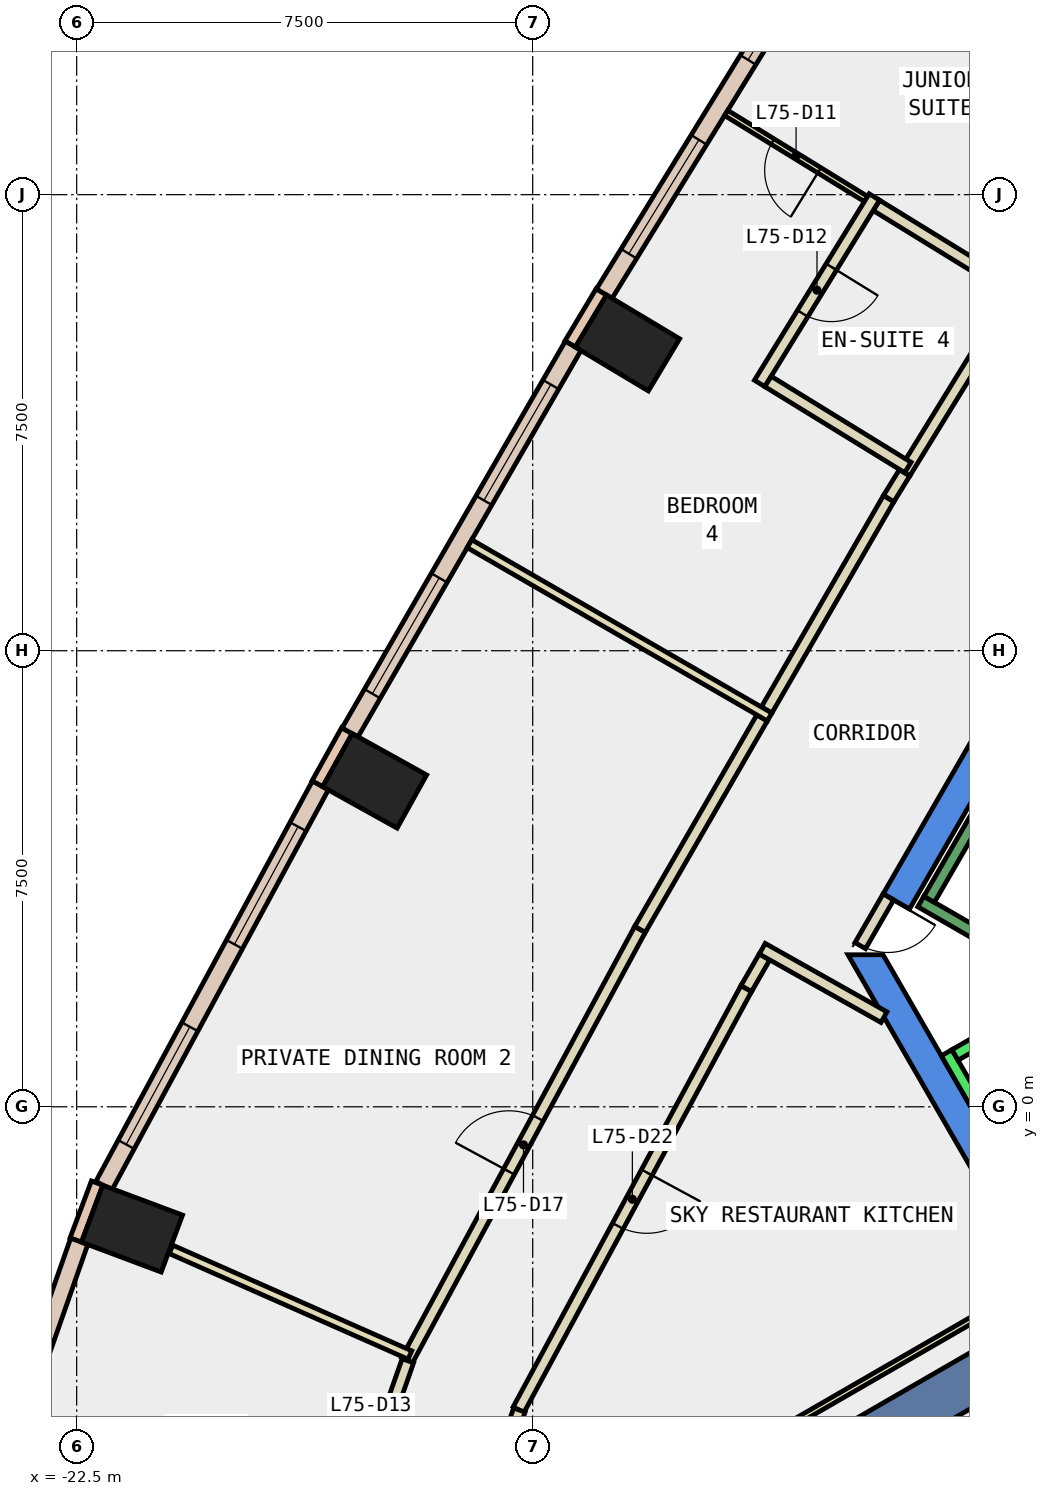
"""IFC4 building model, lengths in metres.
Left out: names, types, materials, properties, quantities, classifications, styles, units other than length and angle.
Written with IfcOpenShell. Run it as: python <this file> out.ifc"""

import sys

from ifc_helpers import new_model, si_unit, direction, frame, frame_2d, origin, origin_2d, place, context, subcontext, project, spatial, polyline, rectangle, outline, extrude, element, fill, save


model = new_model("IFC4")
c1 = context("Model", 3, precision=1e-05, world=origin(), true_north=direction((0.0, 1.0)))
c2 = subcontext(c1, "Body", "Model", "MODEL_VIEW")
j1 = project(units=[si_unit("LENGTHUNIT", "METRE"), si_unit("PLANEANGLEUNIT", "RADIAN")], contexts=[c1])
p1 = place(None, origin())
s1 = spatial("IfcSite", under=j1, at=p1, CompositionType="ELEMENT")
p2 = place(p1, origin())
s2 = spatial("IfcBuilding", under=s1, at=p2, CompositionType="ELEMENT")
p3 = place(p2, frame((0.0, 0.0, 318.8)))
s3 = spatial("IfcBuildingStorey", under=s2, at=p3, CompositionType="ELEMENT", Elevation=318.8)
for number, where, z_axis, x_axis in (
    (1, (-13.441, 12.561, -0.34), (0.0, 0.0, 1.0), (0.514, 0.858, 0.0)),
    (2, (-17.599, 5.36, -0.34), (0.0, 0.0, 1.0), (0.486, 0.874, 0.0)),
    (3, (-21.59, -2.004, -0.34), (0.0, 0.0, 1.0), (0.351, 0.936, 0.0)),
):
    element("IfcColumn", number, at=place(p3, frame(where, z_axis=z_axis, x_axis=x_axis)), inside=s3, PredefinedType="COLUMN", context=c2, shape_type="SweptSolid", body=[
        extrude(rectangle(XDim=1.0, YDim=1.4, at=origin_2d()), origin(), (0.0, 0.0, 1.0), 3.6),
    ])
p4 = place(p3, frame((0.0, 0.0, -0.34)))
e4 = element("IfcWall", 4, at=p4, inside=s3, PredefinedType="SHEAR", context=c2, shape_type="SweptSolid", body=[
    extrude(outline(polyline([(-9.236, 3.502), (-8.803, 3.253), (-4.619, 10.5), (-4.907, 11.0), (-9.236, 3.502)])), origin(), (0.0, 0.0, 1.0), 3.6),
])
p5 = place(p3, frame((0.0, 0.0, -0.34)))
e5 = element("IfcWall", 5, at=p5, inside=s3, PredefinedType="SHEAR", context=c2, shape_type="SweptSolid", body=[
    extrude(outline(polyline([(-9.815, 2.5), (-4.907, -6.0), (-4.619, -5.5), (-9.238, 2.5), (-9.815, 2.5)])), origin(), (0.0, 0.0, 1.0), 3.6),
])
p6 = place(p3, frame((-6.279, -3.625, -0.34), z_axis=(0.0, 0.0, 1.0), x_axis=(-0.866017533419, -0.500013631625, 0.0)))
e6 = element("IfcWall", 6, at=p6, inside=s3, PredefinedType="SHEAR", context=c2, shape_type="SweptSolid", body=[
    extrude(rectangle(XDim=9.0, YDim=0.8, at=frame_2d((4.5, 0.0))), origin(), (0.0, 0.0, 1.0), 3.6),
])
p7 = place(p3, frame((-13.87, 13.402, 0.0), z_axis=(0.0, 0.0, 1.0), x_axis=(-0.513777707721, -0.857923345672, 0.0)))
e7 = element("IfcWall", 7, at=p7, inside=s3, PredefinedType="STANDARD", context=c2, shape_type="SweptSolid", body=[
    extrude(rectangle(XDim=1.0, YDim=0.2, at=frame_2d((0.5, 0.0))), origin(), (0.0, 0.0, 1.0), 3.26),
])
p8 = place(p3, frame((-18.056, 6.185, 0.0), z_axis=(0.0, 0.0, 1.0), x_axis=(-0.486036693078, -0.873938403425, 0.0)))
e8 = element("IfcWall", 8, at=p8, inside=s3, PredefinedType="STANDARD", context=c2, shape_type="SweptSolid", body=[
    extrude(rectangle(XDim=1.0, YDim=0.2, at=frame_2d((0.5, 0.0))), origin(), (0.0, 0.0, 1.0), 3.26),
])
p9 = place(p3, frame((-22.164, -1.255, 0.0), z_axis=(0.0, 0.0, 1.0), x_axis=(-0.350962844851, -0.936389385637, 0.0)))
e9 = element("IfcWall", 9, at=p9, inside=s3, PredefinedType="STANDARD", context=c2, shape_type="SweptSolid", body=[
    extrude(rectangle(XDim=1.0, YDim=0.2, at=frame_2d((0.5, 0.0))), origin(), (0.0, 0.0, 1.0), 3.26),
])
p10 = place(p3, frame((-9.901, 19.747, 0.0), z_axis=(0.0, 0.0, 1.0), x_axis=(-0.524004608874, -0.851715427757, 0.0)))
e10 = element("IfcWall", 10, at=p10, inside=s3, PredefinedType="STANDARD", context=c2, shape_type="SweptSolid", body=[
    extrude(rectangle(XDim=7.485, YDim=0.3, at=frame_2d((3.742, 0.0))), origin(), (0.0, 0.0, 1.0), 3.26),
])
p11 = place(p10, frame((0.771, 0.0, 0.9)))
e11 = element("IfcOpeningElement", 11, at=p11, cuts=e10, PredefinedType="OPENING", context=c2, shape_type="SweptSolid", body=[
    extrude(rectangle(XDim=2.2, YDim=2.0, at=frame_2d((1.1, 1.0))), frame((0.0, 0.16, 0.0), z_axis=(0.0, -1.0, 0.0), x_axis=(1.0, 0.0, 0.0)), (0.0, 0.0, 1.0), 0.32),
])
p12 = place(p10, frame((4.514, 0.0, 0.9)))
e12 = element("IfcOpeningElement", 12, at=p12, cuts=e10, PredefinedType="OPENING", context=c2, shape_type="SweptSolid", body=[
    extrude(rectangle(XDim=2.2, YDim=2.0, at=frame_2d((1.1, 1.0))), frame((0.0, 0.16, 0.0), z_axis=(0.0, -1.0, 0.0), x_axis=(1.0, 0.0, 0.0)), (0.0, 0.0, 1.0), 0.32),
])
p13 = place(p3, frame((-14.334, 12.515, 0.0), z_axis=(0.0, 0.0, 1.0), x_axis=(-0.499958474759, -0.866049377066, 0.0)))
e13 = element("IfcWall", 13, at=p13, inside=s3, PredefinedType="STANDARD", context=c2, shape_type="SweptSolid", body=[
    extrude(rectangle(XDim=7.342, YDim=0.3, at=frame_2d((3.671, 0.0))), origin(), (0.0, 0.0, 1.0), 3.26),
])
p14 = place(p13, frame((0.736, 0.0, 0.9)))
e14 = element("IfcOpeningElement", 14, at=p14, cuts=e13, PredefinedType="OPENING", context=c2, shape_type="SweptSolid", body=[
    extrude(rectangle(XDim=2.2, YDim=2.0, at=frame_2d((1.1, 1.0))), frame((0.0, 0.16, 0.0), z_axis=(0.0, -1.0, 0.0), x_axis=(1.0, 0.0, 0.0)), (0.0, 0.0, 1.0), 0.32),
])
p15 = place(p13, frame((4.407, 0.0, 0.9)))
e15 = element("IfcOpeningElement", 15, at=p15, cuts=e13, PredefinedType="OPENING", context=c2, shape_type="SweptSolid", body=[
    extrude(rectangle(XDim=2.2, YDim=2.0, at=frame_2d((1.1, 1.0))), frame((0.0, 0.16, 0.0), z_axis=(0.0, -1.0, 0.0), x_axis=(1.0, 0.0, 0.0)), (0.0, 0.0, 1.0), 0.32),
])
p16 = place(p3, frame((-18.492, 5.285, 0.0), z_axis=(0.0, 0.0, 1.0), x_axis=(-0.475690331633, -0.879612817319, 0.0)))
e16 = element("IfcWall", 16, at=p16, inside=s3, PredefinedType="STANDARD", context=c2, shape_type="SweptSolid", body=[
    extrude(rectangle(XDim=7.484, YDim=0.3, at=frame_2d((3.742, 0.0))), origin(), (0.0, 0.0, 1.0), 3.26),
])
p17 = place(p16, frame((0.771, 0.0, 0.9)))
e17 = element("IfcOpeningElement", 17, at=p17, cuts=e16, PredefinedType="OPENING", context=c2, shape_type="SweptSolid", body=[
    extrude(rectangle(XDim=2.2, YDim=2.0, at=frame_2d((1.1, 1.0))), frame((0.0, 0.16, 0.0), z_axis=(0.0, -1.0, 0.0), x_axis=(1.0, 0.0, 0.0)), (0.0, 0.0, 1.0), 0.32),
])
p18 = place(p16, frame((4.513, 0.0, 0.9)))
e18 = element("IfcOpeningElement", 18, at=p18, cuts=e16, PredefinedType="OPENING", context=c2, shape_type="SweptSolid", body=[
    extrude(rectangle(XDim=2.2, YDim=2.0, at=frame_2d((1.1, 1.0))), frame((0.0, 0.16, 0.0), z_axis=(0.0, -1.0, 0.0), x_axis=(1.0, 0.0, 0.0)), (0.0, 0.0, 1.0), 0.32),
])
p19 = place(p3, frame((-22.458, -2.212, 0.0), z_axis=(0.0, 0.0, 1.0), x_axis=(-0.330923030855, -0.943657749213, 0.0)))
e19 = element("IfcWall", 19, at=p19, inside=s3, PredefinedType="STANDARD", context=c2, shape_type="SweptSolid", body=[
    extrude(rectangle(XDim=4.748, YDim=0.3, at=frame_2d((2.374, 0.0))), origin(), (0.0, 0.0, 1.0), 3.26),
])
p20 = place(p19, frame((1.674, 0.0, 0.9)))
e20 = element("IfcOpeningElement", 20, at=p20, cuts=e19, PredefinedType="OPENING", context=c2, shape_type="SweptSolid", body=[
    extrude(rectangle(XDim=1.4, YDim=2.0, at=frame_2d((0.7, 1.0))), frame((0.0, 0.16, 0.0), z_axis=(0.0, -1.0, 0.0), x_axis=(1.0, 0.0, 0.0)), (0.0, 0.0, 1.0), 0.32),
])
p21 = place(p3, frame((-11.188, 2.464, 0.0), z_axis=(0.0, 0.0, 1.0), x_axis=(-0.499406844493, -0.866367591542, 0.0)))
e21 = element("IfcWall", 21, at=p21, inside=s3, PredefinedType="PARTITIONING", context=c2, shape_type="SweptSolid", body=[
    extrude(rectangle(XDim=0.603, YDim=0.2, at=frame_2d((0.301, 0.0))), origin(), (0.0, 0.0, 1.0), 3.26),
])
p22 = place(p3, frame((-11.489, 1.942, 0.0), z_axis=(0.0, 0.0, 1.0), x_axis=(-0.475643534049, -0.879638123615, 0.0)))
e22 = element("IfcWall", 22, at=p22, inside=s3, PredefinedType="PARTITIONING", context=c2, shape_type="SweptSolid", body=[
    extrude(rectangle(XDim=7.871, YDim=0.2, at=frame_2d((3.936, 0.0))), origin(), (0.0, 0.0, 1.0), 3.26),
])
p23 = place(p22, frame((3.436, 0.0, 0.0)))
e23 = element("IfcOpeningElement", 23, at=p23, cuts=e22, PredefinedType="OPENING", context=c2, shape_type="SweptSolid", body=[
    extrude(rectangle(XDim=1.0, YDim=2.1, at=frame_2d((0.5, 1.05))), frame((0.0, 0.11, 0.0), z_axis=(0.0, -1.0, 0.0), x_axis=(1.0, 0.0, 0.0)), (0.0, 0.0, 1.0), 0.22),
])
p24 = place(p3, frame((-15.219, -4.988, 0.0), z_axis=(0.0, 0.0, 1.0), x_axis=(-0.330981563235, -0.943637220969, 0.0)))
e24 = element("IfcWall", 24, at=p24, inside=s3, PredefinedType="PARTITIONING", context=c2, shape_type="SweptSolid", body=[
    extrude(rectangle(XDim=2.946, YDim=0.2, at=frame_2d((1.473, 0.0))), origin(), (0.0, 0.0, 1.0), 3.26),
])
p25 = place(p3, frame((-9.223, 1.474, 0.0), z_axis=(0.0, 0.0, 1.0), x_axis=(-0.871623785844, 0.490175454251, 0.0)))
e25 = element("IfcWall", 25, at=p25, inside=s3, PredefinedType="PARTITIONING", context=c2, shape_type="SweptSolid", body=[
    extrude(rectangle(XDim=2.297, YDim=0.2, at=frame_2d((1.148, 0.0))), origin(), (0.0, 0.0, 1.0), 3.26),
])
p26 = place(p3, frame((-11.153, 6.525, 0.0), z_axis=(0.0, 0.0, 1.0), x_axis=(0.500108414701, 0.865962801479, 0.0)))
e26 = element("IfcWall", 26, at=p26, inside=s3, PredefinedType="PARTITIONING", context=c2, shape_type="SweptSolid", body=[
    extrude(rectangle(XDim=4.015, YDim=0.2, at=frame_2d((2.008, 0.0))), origin(), (0.0, 0.0, 1.0), 3.26),
])
p27 = place(p3, frame((-9.145, 10.002, 0.0), z_axis=(0.0, 0.0, 1.0), x_axis=(0.523797791684, 0.851842634192, 0.0)))
e27 = element("IfcWall", 27, at=p27, inside=s3, PredefinedType="PARTITIONING", context=c2, shape_type="SweptSolid", body=[
    extrude(rectangle(XDim=0.5, YDim=0.2, at=frame_2d((0.25, 0.0))), origin(), (0.0, 0.0, 1.0), 3.26),
])
p28 = place(p3, frame((-8.883, 10.428, 0.0), z_axis=(0.0, 0.0, 1.0), x_axis=(0.524061371587, 0.851680502777, 0.0)))
e28 = element("IfcWall", 28, at=p28, inside=s3, PredefinedType="PARTITIONING", context=c2, shape_type="SweptSolid", body=[
    extrude(rectangle(XDim=3.4, YDim=0.2, at=frame_2d((1.7, 0.0))), origin(), (0.0, 0.0, 1.0), 3.26),
])
p29 = place(p3, frame((-17.068, -4.17, 0.0), z_axis=(0.0, 0.0, 1.0), x_axis=(0.475681790703, 0.879617436158, 0.0)))
e29 = element("IfcWall", 29, at=p29, inside=s3, PredefinedType="PARTITIONING", context=c2, shape_type="SweptSolid", body=[
    extrude(rectangle(XDim=8.058, YDim=0.2, at=frame_2d((4.029, 0.0))), origin(), (0.0, 0.0, 1.0), 3.26),
])
p30 = place(p29, frame((3.529, 0.0, 0.0)))
e30 = element("IfcOpeningElement", 30, at=p30, cuts=e29, PredefinedType="OPENING", context=c2, shape_type="SweptSolid", body=[
    extrude(rectangle(XDim=1.0, YDim=2.1, at=frame_2d((0.5, 1.05))), frame((0.0, 0.11, 0.0), z_axis=(0.0, -1.0, 0.0), x_axis=(1.0, 0.0, 0.0)), (0.0, 0.0, 1.0), 0.22),
])
p31 = place(p3, frame((-13.235, 2.918, 0.0), z_axis=(0.0, 0.0, 1.0), x_axis=(0.49992599743, 0.866068124973, 0.0)))
e31 = element("IfcWall", 31, at=p31, inside=s3, PredefinedType="PARTITIONING", context=c2, shape_type="SweptSolid", body=[
    extrude(rectangle(XDim=4.015, YDim=0.2, at=frame_2d((2.007, 0.0))), origin(), (0.0, 0.0, 1.0), 3.26),
])
p32 = place(p3, frame((-18.271, -7.648, 0.0), z_axis=(0.0, 0.0, 1.0), x_axis=(0.33112192567, 0.943587977001, 0.0)))
e32 = element("IfcWall", 32, at=p32, inside=s3, PredefinedType="PARTITIONING", context=c2, shape_type="SweptSolid", body=[
    extrude(rectangle(XDim=3.678, YDim=0.2, at=frame_2d((1.839, 0.0))), origin(), (0.0, 0.0, 1.0), 3.26),
])
p33 = place(p32, frame((1.339, 0.0, 0.0)))
e33 = element("IfcOpeningElement", 33, at=p33, cuts=e32, PredefinedType="OPENING", context=c2, shape_type="SweptSolid", body=[
    extrude(rectangle(XDim=1.0, YDim=2.1, at=frame_2d((0.5, 1.05))), frame((0.0, 0.11, 0.0), z_axis=(0.0, -1.0, 0.0), x_axis=(1.0, 0.0, 0.0)), (0.0, 0.0, 1.0), 0.22),
])
p34 = place(p3, frame((-6.705, -2.887, 0.0), z_axis=(0.0, 0.0, 1.0), x_axis=(-0.866001397039, -0.500041578597, 0.0)))
e34 = element("IfcWall", 34, at=p34, inside=s3, PredefinedType="PARTITIONING", context=c2, shape_type="SweptSolid", body=[
    extrude(rectangle(XDim=6.998, YDim=0.1, at=frame_2d((3.499, 0.0))), origin(), (0.0, 0.0, 1.0), 3.26),
])
p35 = place(p3, frame((-4.893, 16.723, 0.0), z_axis=(0.0, 0.0, 1.0), x_axis=(-0.807632235509, 0.589686503294, 0.0)))
e35 = element("IfcWall", 35, at=p35, inside=s3, PredefinedType="PARTITIONING", context=c2, shape_type="SweptSolid", body=[
    extrude(rectangle(XDim=4.396, YDim=0.15, at=frame_2d((2.198, 0.0))), origin(), (0.0, 0.0, 1.0), 3.26),
])
p36 = place(p3, frame((-9.519, 14.929, 0.0), z_axis=(0.0, 0.0, 1.0), x_axis=(-0.851621054013, 0.524157972715, 0.0)))
e36 = element("IfcWall", 36, at=p36, inside=s3, PredefinedType="PARTITIONING", context=c2, shape_type="SweptSolid", body=[
    extrude(rectangle(XDim=2.7, YDim=0.1, at=frame_2d((1.35, 0.0))), origin(), (0.0, 0.0, 1.0), 3.26),
])
p37 = place(p36, frame((0.9, 0.0, 0.0)))
e37 = element("IfcOpeningElement", 37, at=p37, cuts=e36, PredefinedType="OPENING", context=c2, shape_type="SweptSolid", body=[
    extrude(rectangle(XDim=0.9, YDim=2.1, at=frame_2d((0.45, 1.05))), frame((0.0, 0.06, 0.0), z_axis=(0.0, -1.0, 0.0), x_axis=(1.0, 0.0, 0.0)), (0.0, 0.0, 1.0), 0.12),
])
p38 = place(p3, frame((-7.134, 13.462, 0.0), z_axis=(0.0, 0.0, 1.0), x_axis=(-0.851713135301, 0.524008335007, 0.0)))
e38 = element("IfcWall", 38, at=p38, inside=s3, PredefinedType="PARTITIONING", context=c2, shape_type="SweptSolid", body=[
    extrude(rectangle(XDim=2.599, YDim=0.2, at=frame_2d((1.3, 0.0))), origin(), (0.0, 0.0, 1.0), 3.26),
])
p39 = place(p3, frame((-9.381, 14.962, 0.0), z_axis=(0.0, 0.0, 1.0), x_axis=(-0.524146612914, -0.851628045669, 0.0)))
e39 = element("IfcWall", 39, at=p39, inside=s3, PredefinedType="PARTITIONING", context=c2, shape_type="SweptSolid", body=[
    extrude(rectangle(XDim=3.6, YDim=0.2, at=frame_2d((1.8, 0.0))), origin(), (0.0, 0.0, 1.0), 3.26),
])
p40 = place(p39, frame((1.35, 0.0, 0.0)))
e40 = element("IfcOpeningElement", 40, at=p40, cuts=e39, PredefinedType="OPENING", context=c2, shape_type="SweptSolid", body=[
    extrude(rectangle(XDim=0.9, YDim=2.1, at=frame_2d((0.45, 1.05))), frame((0.0, 0.11, 0.0), z_axis=(0.0, -1.0, 0.0), x_axis=(1.0, 0.0, 0.0)), (0.0, 0.0, 1.0), 0.22),
])
p41 = place(p3, frame((-11.13, 11.928, 0.0), z_axis=(0.0, 0.0, 1.0), x_axis=(0.851856970107, -0.523774476737, 0.0)))
e41 = element("IfcWall", 41, at=p41, inside=s3, PredefinedType="PARTITIONING", context=c2, shape_type="SweptSolid", body=[
    extrude(rectangle(XDim=2.7, YDim=0.2, at=frame_2d((1.35, 0.0))), origin(), (0.0, 0.0, 1.0), 3.26),
])
p42 = place(p3, frame((-11.104, 6.41, 0.0), z_axis=(0.0, 0.0, 1.0), x_axis=(-0.866004402611, 0.500036373335, 0.0)))
e42 = element("IfcWall", 42, at=p42, inside=s3, PredefinedType="PARTITIONING", context=c2, shape_type="SweptSolid", body=[
    extrude(rectangle(XDim=5.7, YDim=0.15, at=frame_2d((2.85, 0.0))), origin(), (0.0, 0.0, 1.0), 3.26),
])
p43 = place(p3, frame((-17.02, -4.082, 0.0), z_axis=(0.0, 0.0, 1.0), x_axis=(-0.914599611743, 0.404360668462, 0.0)))
e43 = element("IfcWall", 43, at=p43, inside=s3, PredefinedType="PARTITIONING", context=c2, shape_type="SweptSolid", body=[
    extrude(rectangle(XDim=4.296, YDim=0.15, at=frame_2d((2.148, 0.0))), origin(), (0.0, 0.0, 1.0), 3.26),
])
p44 = place(p3, frame((-9.15, 3.452, 0.0), z_axis=(0.0, 0.0, 1.0), x_axis=(-0.500079945886, -0.865979242085, 0.0)))
e44 = element("IfcWall", 44, at=p44, inside=s3, PredefinedType="PARTITIONING", context=c2, shape_type="SweptSolid", body=[
    extrude(rectangle(XDim=0.926, YDim=0.2, at=frame_2d((0.463, 0.0))), origin(), (0.0, 0.0, 1.0), 2.4),
])
p45 = place(p44, frame((0.017, 0.0, 0.0)))
e45 = element("IfcOpeningElement", 45, at=p45, cuts=e44, PredefinedType="OPENING", context=c2, shape_type="SweptSolid", body=[
    extrude(rectangle(XDim=0.9, YDim=2.1, at=frame_2d((0.45, 1.05))), frame((0.0, 0.11, 0.0), z_axis=(0.0, -1.0, 0.0), x_axis=(1.0, 0.0, 0.0)), (0.0, 0.0, 1.0), 0.22),
])
p46 = place(p3, frame((-8.192, 0.888, 0.0), z_axis=(0.0, 0.0, 1.0), x_axis=(0.500034260056, -0.866005622828, 0.0)))
e46 = element("IfcWall", 46, at=p46, inside=s3, PredefinedType="STANDARD", context=c2, shape_type="SweptSolid", body=[
    extrude(rectangle(XDim=5.399, YDim=0.2, at=frame_2d((2.7, 0.0))), origin(), (0.0, 0.0, 1.0), 3.26),
])
p47 = place(p3, frame((-5.977, 2.052, 0.0), z_axis=(0.0, 0.0, 1.0), x_axis=(-0.865973769406, -0.500089422704, 0.0)))
e47 = element("IfcWall", 47, at=p47, inside=s3, PredefinedType="STANDARD", context=c2, shape_type="SweptSolid", body=[
    extrude(rectangle(XDim=2.399, YDim=0.2, at=frame_2d((1.2, 0.0))), origin(), (0.0, 0.0, 1.0), 3.26),
])
p48 = place(p3, frame((-6.25, 2.01, 0.0), z_axis=(0.0, 0.0, 1.0), x_axis=(-0.86611865017, 0.499838457731, 0.0)))
e48 = element("IfcWall", 48, at=p48, inside=s3, PredefinedType="STANDARD", context=c2, shape_type="SweptSolid", body=[
    extrude(rectangle(XDim=2.733, YDim=0.2, at=frame_2d((1.366, 0.0))), origin(), (0.0, 0.0, 1.0), 3.26),
])
p49 = place(p3, frame((-5.03, 9.388, 0.0), z_axis=(0.0, 0.0, 1.0), x_axis=(-0.499978703459, -0.866037698999, 0.0)))
e49 = element("IfcWall", 49, at=p49, inside=s3, PredefinedType="STANDARD", context=c2, shape_type="SweptSolid", body=[
    extrude(rectangle(XDim=6.9, YDim=0.2, at=frame_2d((3.45, 0.0))), origin(), (0.0, 0.0, 1.0), 3.26),
])
p50 = place(p11, origin())
e50 = element("IfcWindow", 50, at=p50, inside=s3, PartitioningType="SINGLE_PANEL", PredefinedType="WINDOW", context=c2, shape_type="SweptSolid", body=[
    extrude(rectangle(XDim=2.2, YDim=2.0, at=frame_2d((1.1, 1.0))), frame((0.0, 0.03, 0.0), z_axis=(0.0, -1.0, 0.0), x_axis=(1.0, 0.0, 0.0)), (0.0, 0.0, 1.0), 0.06),
])
fill(e11, e50)
p51 = place(p12, origin())
e51 = element("IfcWindow", 51, at=p51, inside=s3, PartitioningType="SINGLE_PANEL", PredefinedType="WINDOW", context=c2, shape_type="SweptSolid", body=[
    extrude(rectangle(XDim=2.2, YDim=2.0, at=frame_2d((1.1, 1.0))), frame((0.0, 0.03, 0.0), z_axis=(0.0, -1.0, 0.0), x_axis=(1.0, 0.0, 0.0)), (0.0, 0.0, 1.0), 0.06),
])
fill(e12, e51)
p52 = place(p14, origin())
e52 = element("IfcWindow", 52, at=p52, inside=s3, PartitioningType="SINGLE_PANEL", PredefinedType="WINDOW", context=c2, shape_type="SweptSolid", body=[
    extrude(rectangle(XDim=2.2, YDim=2.0, at=frame_2d((1.1, 1.0))), frame((0.0, 0.03, 0.0), z_axis=(0.0, -1.0, 0.0), x_axis=(1.0, 0.0, 0.0)), (0.0, 0.0, 1.0), 0.06),
])
fill(e14, e52)
p53 = place(p15, origin())
e53 = element("IfcWindow", 53, at=p53, inside=s3, PartitioningType="SINGLE_PANEL", PredefinedType="WINDOW", context=c2, shape_type="SweptSolid", body=[
    extrude(rectangle(XDim=2.2, YDim=2.0, at=frame_2d((1.1, 1.0))), frame((0.0, 0.03, 0.0), z_axis=(0.0, -1.0, 0.0), x_axis=(1.0, 0.0, 0.0)), (0.0, 0.0, 1.0), 0.06),
])
fill(e15, e53)
p54 = place(p17, origin())
e54 = element("IfcWindow", 54, at=p54, inside=s3, PartitioningType="SINGLE_PANEL", PredefinedType="WINDOW", context=c2, shape_type="SweptSolid", body=[
    extrude(rectangle(XDim=2.2, YDim=2.0, at=frame_2d((1.1, 1.0))), frame((0.0, 0.03, 0.0), z_axis=(0.0, -1.0, 0.0), x_axis=(1.0, 0.0, 0.0)), (0.0, 0.0, 1.0), 0.06),
])
fill(e17, e54)
p55 = place(p18, origin())
e55 = element("IfcWindow", 55, at=p55, inside=s3, PartitioningType="SINGLE_PANEL", PredefinedType="WINDOW", context=c2, shape_type="SweptSolid", body=[
    extrude(rectangle(XDim=2.2, YDim=2.0, at=frame_2d((1.1, 1.0))), frame((0.0, 0.03, 0.0), z_axis=(0.0, -1.0, 0.0), x_axis=(1.0, 0.0, 0.0)), (0.0, 0.0, 1.0), 0.06),
])
fill(e18, e55)
p56 = place(p37, origin())
e56 = element("IfcDoor", 56, at=p56, inside=s3, OperationType="SINGLE_SWING_RIGHT", PredefinedType="DOOR", context=c2, shape_type="SweptSolid", body=[
    extrude(rectangle(XDim=0.9, YDim=2.1, at=frame_2d((0.45, 1.05))), frame((0.0, 0.025, 0.0), z_axis=(0.0, -1.0, 0.0), x_axis=(1.0, 0.0, 0.0)), (0.0, 0.0, 1.0), 0.05),
])
fill(e37, e56)
p57 = place(p40, origin())
e57 = element("IfcDoor", 57, at=p57, inside=s3, OperationType="SINGLE_SWING_RIGHT", PredefinedType="DOOR", context=c2, shape_type="SweptSolid", body=[
    extrude(rectangle(XDim=0.9, YDim=2.1, at=frame_2d((0.45, 1.05))), frame((0.0, 0.025, 0.0), z_axis=(0.0, -1.0, 0.0), x_axis=(1.0, 0.0, 0.0)), (0.0, 0.0, 1.0), 0.05),
])
fill(e40, e57)
p58 = place(p30, origin())
e58 = element("IfcDoor", 58, at=p58, inside=s3, OperationType="SINGLE_SWING_LEFT", PredefinedType="DOOR", context=c2, shape_type="SweptSolid", body=[
    extrude(rectangle(XDim=1.0, YDim=2.1, at=frame_2d((0.5, 1.05))), frame((0.0, 0.025, 0.0), z_axis=(0.0, -1.0, 0.0), x_axis=(1.0, 0.0, 0.0)), (0.0, 0.0, 1.0), 0.05),
])
fill(e30, e58)
p59 = place(p23, origin())
e59 = element("IfcDoor", 59, at=p59, inside=s3, OperationType="SINGLE_SWING_LEFT", PredefinedType="DOOR", context=c2, shape_type="SweptSolid", body=[
    extrude(rectangle(XDim=1.0, YDim=2.1, at=frame_2d((0.5, 1.05))), frame((0.0, 0.025, 0.0), z_axis=(0.0, -1.0, 0.0), x_axis=(1.0, 0.0, 0.0)), (0.0, 0.0, 1.0), 0.05),
])
fill(e23, e59)
p60 = place(p45, origin())
e60 = element("IfcDoor", 60, at=p60, inside=s3, OperationType="SINGLE_SWING_LEFT", PredefinedType="DOOR", context=c2, shape_type="SweptSolid", body=[
    extrude(rectangle(XDim=0.9, YDim=2.1, at=frame_2d((0.45, 1.05))), frame((0.0, 0.025, 0.0), z_axis=(0.0, -1.0, 0.0), x_axis=(1.0, 0.0, 0.0)), (0.0, 0.0, 1.0), 0.05),
])
fill(e45, e60)
save(model, sys.argv[1])
